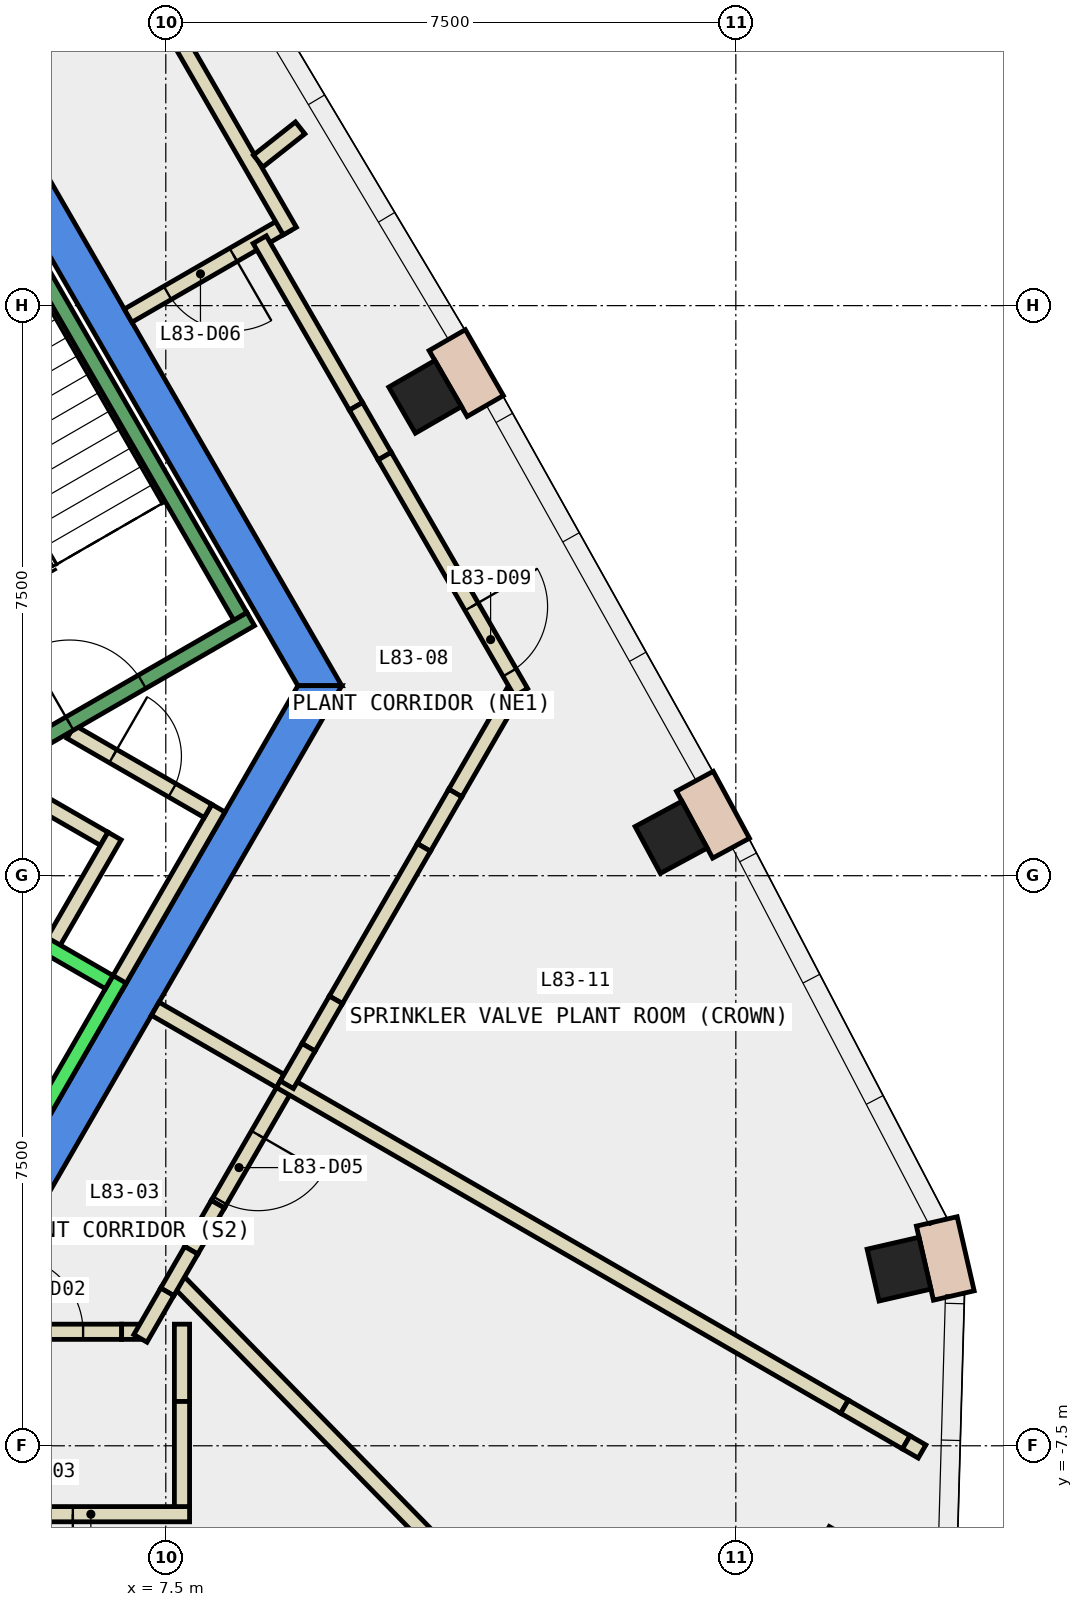
"""IFC4 building model, lengths in metres.
Left out: names, types, materials, properties, quantities, classifications, styles, units other than length and angle.
Written with IfcOpenShell. Run it as: python <this file> out.ifc"""

import sys

from ifc_helpers import new_model, si_unit, direction, frame, frame_2d, origin, origin_2d, place, context, subcontext, project, spatial, polyline, rectangle, outline, extrude, element, fill, save


model = new_model("IFC4")
c1 = context("Model", 3, precision=1e-05, world=origin(), true_north=direction((0.0, 1.0)))
c2 = subcontext(c1, "Body", "Model", "MODEL_VIEW")
j1 = project(units=[si_unit("LENGTHUNIT", "METRE"), si_unit("PLANEANGLEUNIT", "RADIAN")], contexts=[c1])
p1 = place(None, origin())
s1 = spatial("IfcSite", under=j1, at=p1, CompositionType="ELEMENT")
p2 = place(p1, origin())
s2 = spatial("IfcBuilding", under=s1, at=p2, CompositionType="ELEMENT")
p3 = place(p2, frame((0.0, 0.0, 353.9)))
s3 = spatial("IfcBuildingStorey", under=s2, at=p3, CompositionType="ELEMENT", Elevation=353.9)
p4 = place(p3, frame((16.486, -9.519, -0.35), z_axis=(0.0, 0.0, 1.0), x_axis=(-0.866025403784, 0.5, 0.0)))
e1 = element("IfcColumn", 1, at=p4, inside=s3, PredefinedType="COLUMN", context=c2, shape_type="SweptSolid", body=[
    extrude(rectangle(XDim=1.4, YDim=1.4, at=origin_2d()), origin(), (0.0, 0.0, 1.0), 4.4),
])
for number, where, z_axis, x_axis in (
    (2, (17.147, -5.176, -0.35), (0.0, 0.0, 1.0), (-0.224, 0.974, 0.0)),
    (3, (14.149, 0.505, -0.35), (0.0, 0.0, 1.0), (-0.475, 0.88, 0.0)),
    (4, (10.912, 6.3, -0.35), (0.0, 0.0, 1.0), (-0.5, 0.866, 0.0)),
):
    element("IfcColumn", number, at=place(p3, frame(where, z_axis=z_axis, x_axis=x_axis)), inside=s3, PredefinedType="COLUMN", context=c2, shape_type="SweptSolid", body=[
        extrude(rectangle(XDim=0.7, YDim=0.7, at=origin_2d()), origin(), (0.0, 0.0, 1.0), 4.4),
    ])
p5 = place(p3, frame((0.0, 0.0, -0.35)))
e5 = element("IfcWall", 5, at=p5, inside=s3, PredefinedType="SHEAR", context=c2, shape_type="SweptSolid", body=[
    extrude(outline(polyline([(5.486, 9.998), (5.053, 9.748), (9.238, 2.5), (9.815, 2.5), (5.486, 9.998)])), origin(), (0.0, 0.0, 1.0), 4.4),
])
p6 = place(p3, frame((0.0, 0.0, -0.35)))
e6 = element("IfcWall", 6, at=p6, inside=s3, PredefinedType="SHEAR", context=c2, shape_type="SweptSolid", body=[
    extrude(outline(polyline([(4.907, -6.0), (9.815, 2.5), (9.238, 2.5), (4.619, -5.5), (4.907, -6.0)])), origin(), (0.0, 0.0, 1.0), 4.4),
])
p7 = place(p3, frame((17.868, -5.523, 0.0), z_axis=(0.0, 0.0, 1.0), x_axis=(-0.223825449309, 0.974629246556, 0.0)))
e7 = element("IfcWall", 7, at=p7, inside=s3, PredefinedType="STANDARD", context=c2, shape_type="SweptSolid", body=[
    extrude(rectangle(XDim=1.0, YDim=0.55, at=frame_2d((0.5, 0.0))), origin(), (0.0, 0.0, 1.0), 4.05),
])
p8 = place(p3, frame((14.937, 0.362, 0.0), z_axis=(0.0, 0.0, 1.0), x_axis=(-0.475874292304, 0.879513307417, 0.0)))
e8 = element("IfcWall", 8, at=p8, inside=s3, PredefinedType="STANDARD", context=c2, shape_type="SweptSolid", body=[
    extrude(rectangle(XDim=1.0, YDim=0.55, at=frame_2d((0.5, 0.0))), origin(), (0.0, 0.0, 1.0), 4.05),
])
p9 = place(p3, frame((11.703, 6.179, 0.0), z_axis=(0.0, 0.0, 1.0), x_axis=(-0.49960277677, 0.866254619292, 0.0)))
e9 = element("IfcWall", 9, at=p9, inside=s3, PredefinedType="STANDARD", context=c2, shape_type="SweptSolid", body=[
    extrude(rectangle(XDim=1.001, YDim=0.55, at=frame_2d((0.5, 0.0))), origin(), (0.0, 0.0, 1.0), 4.05),
])
p10 = place(p3, frame((5.499, 1.172, 0.0), z_axis=(0.0, 0.0, 1.0), x_axis=(0.866333505267, -0.499465972466, 0.0)))
e10 = element("IfcWall", 10, at=p10, inside=s3, PredefinedType="PARTITIONING", context=c2, shape_type="SweptSolid", body=[
    extrude(rectangle(XDim=1.374, YDim=0.2, at=frame_2d((0.687, 0.0))), origin(), (0.0, 0.0, 1.0), 4.05),
])
p11 = place(p3, frame((6.826, 0.522, 0.0), z_axis=(0.0, 0.0, 1.0), x_axis=(-0.500016722714, -0.866015748706, 0.0)))
e11 = element("IfcWall", 11, at=p11, inside=s3, PredefinedType="PARTITIONING", context=c2, shape_type="SweptSolid", body=[
    extrude(rectangle(XDim=1.7, YDim=0.2, at=frame_2d((0.85, 0.0))), origin(), (0.0, 0.0, 1.0), 4.05),
])
p12 = place(p3, frame((8.192, 0.888, 0.0), z_axis=(0.0, 0.0, 1.0), x_axis=(-0.499940625693, -0.866059680843, 0.0)))
e12 = element("IfcWall", 12, at=p12, inside=s3, PredefinedType="PARTITIONING", context=c2, shape_type="SweptSolid", body=[
    extrude(rectangle(XDim=2.68, YDim=0.2, at=frame_2d((1.34, 0.0))), origin(), (0.0, 0.0, 1.0), 4.05),
])
p13 = place(p3, frame((6.25, 1.894, 0.0), z_axis=(0.0, 0.0, 1.0), x_axis=(0.866043184279, -0.499969202016, 0.0)))
e13 = element("IfcWall", 13, at=p13, inside=s3, PredefinedType="PARTITIONING", context=c2, shape_type="SweptSolid", body=[
    extrude(rectangle(XDim=2.084, YDim=0.2, at=frame_2d((1.042, 0.0))), origin(), (0.0, 0.0, 1.0), 4.05),
])
p14 = place(p13, frame((0.642, 0.0, 0.0)))
e14 = element("IfcOpeningElement", 14, at=p14, cuts=e13, PredefinedType="OPENING", context=c2, shape_type="SweptSolid", body=[
    extrude(rectangle(XDim=0.9, YDim=2.1, at=frame_2d((0.45, 1.05))), frame((0.0, 0.11, 0.0), z_axis=(0.0, -1.0, 0.0), x_axis=(1.0, 0.0, 0.0)), (0.0, 0.0, 1.0), 0.22),
])
p15 = place(p3, frame((7.813, -8.4, 0.0), z_axis=(0.0, 0.0, 1.0), x_axis=(-1.0, 0.0, 0.0)))
e15 = element("IfcWall", 15, at=p15, inside=s3, PredefinedType="PARTITIONING", context=c2, shape_type="SweptSolid", body=[
    extrude(rectangle(XDim=2.598, YDim=0.2, at=frame_2d((1.299, 0.0))), origin(), (0.0, 0.0, 1.0), 4.05),
])
p16 = place(p15, frame((1.536, 0.0, 0.0)))
e16 = element("IfcOpeningElement", 16, at=p16, cuts=e15, PredefinedType="OPENING", context=c2, shape_type="SweptSolid", body=[
    extrude(rectangle(XDim=1.0, YDim=2.1, at=frame_2d((0.5, 1.05))), frame((0.0, 0.11, 0.0), z_axis=(0.0, -1.0, 0.0), x_axis=(1.0, 0.0, 0.0)), (0.0, 0.0, 1.0), 0.22),
])
p17 = place(p3, frame((7.713, -5.9, 0.0), z_axis=(0.0, 0.0, 1.0), x_axis=(0.0, -1.0, 0.0)))
e17 = element("IfcWall", 17, at=p17, inside=s3, PredefinedType="PARTITIONING", context=c2, shape_type="SweptSolid", body=[
    extrude(rectangle(XDim=1.017, YDim=0.2, at=frame_2d((0.509, 0.0))), origin(), (0.0, 0.0, 1.0), 1.95),
])
p18 = place(p3, frame((9.093, -2.75, 0.0), z_axis=(0.0, 0.0, 1.0), x_axis=(-0.500145398563, -0.865941441609, 0.0)))
e18 = element("IfcWall", 18, at=p18, inside=s3, PredefinedType="PARTITIONING", context=c2, shape_type="SweptSolid", body=[
    extrude(rectangle(XDim=1.815, YDim=0.2, at=frame_2d((0.908, 0.0))), origin(), (0.0, 0.0, 1.0), 4.05),
])
p19 = place(p18, frame((0.759, 0.0, 0.0)))
e19 = element("IfcOpeningElement", 19, at=p19, cuts=e18, PredefinedType="OPENING", context=c2, shape_type="SweptSolid", body=[
    extrude(rectangle(XDim=1.0, YDim=2.1, at=frame_2d((0.5, 1.05))), frame((0.0, 0.11, 0.0), z_axis=(0.0, -1.0, 0.0), x_axis=(1.0, 0.0, 0.0)), (0.0, 0.0, 1.0), 0.22),
])
p20 = place(p3, frame((7.361, -1.75, 0.0), z_axis=(0.0, 0.0, 1.0), x_axis=(0.865980106173, -0.500078449558, 0.0)))
e20 = element("IfcWall", 20, at=p20, inside=s3, PredefinedType="PARTITIONING", context=c2, shape_type="SweptSolid", body=[
    extrude(rectangle(XDim=1.9, YDim=0.2, at=frame_2d((0.95, 0.0))), origin(), (0.0, 0.0, 1.0), 4.05),
])
p21 = place(p3, frame((7.624, -5.295, 0.0), z_axis=(0.0, 0.0, 1.0), x_axis=(0.699204125851, -0.714922086938, 0.0)))
e21 = element("IfcWall", 21, at=p21, inside=s3, PredefinedType="PARTITIONING", context=c2, shape_type="SweptSolid", body=[
    extrude(rectangle(XDim=8.465, YDim=0.2, at=frame_2d((4.233, 0.0))), origin(), (0.0, 0.0, 1.0), 4.05),
])
p22 = place(p3, frame((9.006, -2.7, 0.0), z_axis=(0.0, 0.0, 1.0), x_axis=(0.866026229868, -0.499998569178, 0.0)))
e22 = element("IfcWall", 22, at=p22, inside=s3, PredefinedType="PARTITIONING", context=c2, shape_type="SweptSolid", body=[
    extrude(rectangle(XDim=8.572, YDim=0.2, at=frame_2d((4.286, 0.0))), origin(), (0.0, 0.0, 1.0), 4.05),
])
p23 = place(p3, frame((9.082, 8.568, 0.0), z_axis=(0.0, 0.0, 1.0), x_axis=(-0.865955154139, -0.50012165622, 0.0)))
e23 = element("IfcWall", 23, at=p23, inside=s3, PredefinedType="PARTITIONING", context=c2, shape_type="SweptSolid", body=[
    extrude(rectangle(XDim=2.4, YDim=0.2, at=frame_2d((1.2, 0.0))), origin(), (0.0, 0.0, 1.0), 4.05),
])
p24 = place(p23, frame((0.8, 0.0, 0.0)))
e24 = element("IfcOpeningElement", 24, at=p24, cuts=e23, PredefinedType="OPENING", context=c2, shape_type="SweptSolid", body=[
    extrude(rectangle(XDim=1.0, YDim=2.1, at=frame_2d((0.5, 1.05))), frame((0.0, 0.11, 0.0), z_axis=(0.0, -1.0, 0.0), x_axis=(1.0, 0.0, 0.0)), (0.0, 0.0, 1.0), 0.22),
])
p25 = place(p3, frame((7.388, 11.502, 0.0), z_axis=(0.0, 0.0, 1.0), x_axis=(0.499993059066, -0.866029411098, 0.0)))
e25 = element("IfcWall", 25, at=p25, inside=s3, PredefinedType="PARTITIONING", context=c2, shape_type="SweptSolid", body=[
    extrude(rectangle(XDim=3.488, YDim=0.2, at=frame_2d((1.744, 0.0))), origin(), (0.0, 0.0, 1.0), 1.95),
])
p26 = place(p3, frame((8.736, 8.368, 0.0), z_axis=(0.0, 0.0, 1.0), x_axis=(0.499945030264, -0.86605713825, 0.0)))
e26 = element("IfcWall", 26, at=p26, inside=s3, PredefinedType="PARTITIONING", context=c2, shape_type="SweptSolid", body=[
    extrude(rectangle(XDim=2.532, YDim=0.2, at=frame_2d((1.266, 0.0))), origin(), (0.0, 0.0, 1.0), 4.05),
])
p27 = place(p3, frame((12.074, 2.413, 0.0), z_axis=(0.0, 0.0, 1.0), x_axis=(-0.499897408884, -0.866084626691, 0.0)))
e27 = element("IfcWall", 27, at=p27, inside=s3, PredefinedType="PARTITIONING", context=c2, shape_type="SweptSolid", body=[
    extrude(rectangle(XDim=1.53, YDim=0.2, at=frame_2d((0.765, 0.0))), origin(), (0.0, 0.0, 1.0), 4.05),
])
p28 = place(p3, frame((9.268, 9.838, 0.0), z_axis=(0.0, 0.0, 1.0), x_axis=(-0.784572335163, -0.620037297988, 0.0)))
e28 = element("IfcWall", 28, at=p28, inside=s3, PredefinedType="PARTITIONING", context=c2, shape_type="SweptSolid", body=[
    extrude(rectangle(XDim=0.705, YDim=0.2, at=frame_2d((0.353, 0.0))), origin(), (0.0, 0.0, 1.0), 1.95),
])
p29 = place(p3, frame((5.076, -6.0, 0.0), z_axis=(0.0, 0.0, 1.0), x_axis=(1.0, 0.0, 0.0)))
e29 = element("IfcWall", 29, at=p29, inside=s3, PredefinedType="PARTITIONING", context=c2, shape_type="SweptSolid", body=[
    extrude(rectangle(XDim=1.843, YDim=0.2, at=frame_2d((0.921, 0.0))), origin(), (0.0, 0.0, 1.0), 4.05),
])
p30 = place(p29, frame((0.336, 0.0, 0.0)))
e30 = element("IfcOpeningElement", 30, at=p30, cuts=e29, PredefinedType="OPENING", context=c2, shape_type="SweptSolid", body=[
    extrude(rectangle(XDim=1.0, YDim=2.1, at=frame_2d((0.5, 1.05))), frame((0.0, 0.11, 0.0), z_axis=(0.0, -1.0, 0.0), x_axis=(1.0, 0.0, 0.0)), (0.0, 0.0, 1.0), 0.22),
])
p31 = place(p3, frame((6.919, -6.0, 0.0), z_axis=(0.0, 0.0, 1.0), x_axis=(1.0, 0.0, 0.0)))
e31 = element("IfcWall", 31, at=p31, inside=s3, PredefinedType="PARTITIONING", context=c2, shape_type="SweptSolid", body=[
    extrude(rectangle(XDim=0.242, YDim=0.2, at=frame_2d((0.121, 0.0))), origin(), (0.0, 0.0, 1.0), 1.95),
])
p32 = place(p3, frame((7.713, -6.917, 0.0), z_axis=(0.0, 0.0, 1.0), x_axis=(0.0, -1.0, 0.0)))
e32 = element("IfcWall", 32, at=p32, inside=s3, PredefinedType="PARTITIONING", context=c2, shape_type="SweptSolid", body=[
    extrude(rectangle(XDim=1.383, YDim=0.2, at=frame_2d((0.691, 0.0))), origin(), (0.0, 0.0, 1.0), 4.05),
])
p33 = place(p3, frame((8.185, -4.322, 0.0), z_axis=(0.0, 0.0, 1.0), x_axis=(-0.500265973451, -0.865871789474, 0.0)))
e33 = element("IfcWall", 33, at=p33, inside=s3, PredefinedType="PARTITIONING", context=c2, shape_type="SweptSolid", body=[
    extrude(rectangle(XDim=0.7, YDim=0.2, at=frame_2d((0.35, 0.0))), origin(), (0.0, 0.0, 1.0), 1.95),
])
p34 = place(p3, frame((7.835, -4.928, 0.0), z_axis=(0.0, 0.0, 1.0), x_axis=(-0.500045805297, -0.865998956469, 0.0)))
e34 = element("IfcWall", 34, at=p34, inside=s3, PredefinedType="PARTITIONING", context=c2, shape_type="SweptSolid", body=[
    extrude(rectangle(XDim=0.632, YDim=0.2, at=frame_2d((0.316, 0.0))), origin(), (0.0, 0.0, 1.0), 4.05),
])
p35 = place(p3, frame((7.519, -5.475, 0.0), z_axis=(0.0, 0.0, 1.0), x_axis=(-0.499782295163, -0.866151059251, 0.0)))
e35 = element("IfcWall", 35, at=p35, inside=s3, PredefinedType="PARTITIONING", context=c2, shape_type="SweptSolid", body=[
    extrude(rectangle(XDim=0.706, YDim=0.2, at=frame_2d((0.353, 0.0))), origin(), (0.0, 0.0, 1.0), 1.95),
])
p36 = place(p3, frame((16.43, -6.986, 0.0), z_axis=(0.0, 0.0, 1.0), x_axis=(0.865942754999, -0.50014312458, 0.0)))
e36 = element("IfcWall", 36, at=p36, inside=s3, PredefinedType="PARTITIONING", context=c2, shape_type="SweptSolid", body=[
    extrude(rectangle(XDim=0.938, YDim=0.2, at=frame_2d((0.469, 0.0))), origin(), (0.0, 0.0, 1.0), 1.95),
])
p37 = place(p3, frame((17.242, -7.455, 0.0), z_axis=(0.0, 0.0, 1.0), x_axis=(0.866422508423, -0.499311562953, 0.0)))
e37 = element("IfcWall", 37, at=p37, inside=s3, PredefinedType="PARTITIONING", context=c2, shape_type="SweptSolid", body=[
    extrude(rectangle(XDim=0.24, YDim=0.2, at=frame_2d((0.12, 0.0))), origin(), (0.0, 0.0, 1.0), 4.05),
])
p38 = place(p3, frame((10.002, 6.175, 0.0), z_axis=(0.0, 0.0, 1.0), x_axis=(0.499750401311, -0.866169461704, 0.0)))
e38 = element("IfcWall", 38, at=p38, inside=s3, PredefinedType="PARTITIONING", context=c2, shape_type="SweptSolid", body=[
    extrude(rectangle(XDim=0.756, YDim=0.2, at=frame_2d((0.378, 0.0))), origin(), (0.0, 0.0, 1.0), 1.95),
])
p39 = place(p3, frame((10.38, 5.52, 0.0), z_axis=(0.0, 0.0, 1.0), x_axis=(0.500083720737, -0.865977062199, 0.0)))
e39 = element("IfcWall", 39, at=p39, inside=s3, PredefinedType="PARTITIONING", context=c2, shape_type="SweptSolid", body=[
    extrude(rectangle(XDim=3.588, YDim=0.2, at=frame_2d((1.794, 0.0))), origin(), (0.0, 0.0, 1.0), 4.05),
])
p40 = place(p39, frame((2.287, 0.0, 0.0)))
e40 = element("IfcOpeningElement", 40, at=p40, cuts=e39, PredefinedType="OPENING", context=c2, shape_type="SweptSolid", body=[
    extrude(rectangle(XDim=1.0, YDim=2.1, at=frame_2d((0.5, 1.05))), frame((0.0, 0.11, 0.0), z_axis=(0.0, -1.0, 0.0), x_axis=(1.0, 0.0, 0.0)), (0.0, 0.0, 1.0), 0.22),
])
p41 = place(p3, frame((11.309, 1.088, 0.0), z_axis=(0.0, 0.0, 1.0), x_axis=(-0.499824743306, -0.866126564642, 0.0)))
e41 = element("IfcWall", 41, at=p41, inside=s3, PredefinedType="PARTITIONING", context=c2, shape_type="SweptSolid", body=[
    extrude(rectangle(XDim=0.826, YDim=0.2, at=frame_2d((0.413, 0.0))), origin(), (0.0, 0.0, 1.0), 1.95),
])
p42 = place(p3, frame((10.896, 0.372, 0.0), z_axis=(0.0, 0.0, 1.0), x_axis=(-0.500096650539, -0.865969595378, 0.0)))
e42 = element("IfcWall", 42, at=p42, inside=s3, PredefinedType="PARTITIONING", context=c2, shape_type="SweptSolid", body=[
    extrude(rectangle(XDim=2.315, YDim=0.2, at=frame_2d((1.158, 0.0))), origin(), (0.0, 0.0, 1.0), 4.05),
])
p43 = place(p3, frame((9.738, -1.633, 0.0), z_axis=(0.0, 0.0, 1.0), x_axis=(-0.499820234884, -0.866129166349, 0.0)))
e43 = element("IfcWall", 43, at=p43, inside=s3, PredefinedType="PARTITIONING", context=c2, shape_type="SweptSolid", body=[
    extrude(rectangle(XDim=0.72, YDim=0.2, at=frame_2d((0.36, 0.0))), origin(), (0.0, 0.0, 1.0), 1.95),
])
p44 = place(p3, frame((9.378, -2.257, 0.0), z_axis=(0.0, 0.0, 1.0), x_axis=(-0.500427620203, -0.86577837634, 0.0)))
e44 = element("IfcWall", 44, at=p44, inside=s3, PredefinedType="PARTITIONING", context=c2, shape_type="SweptSolid", body=[
    extrude(rectangle(XDim=0.569, YDim=0.2, at=frame_2d((0.285, 0.0))), origin(), (0.0, 0.0, 1.0), 4.05),
])
p45 = place(p3, frame((5.492, -3.788, 0.0), z_axis=(0.0, 0.0, 1.0), x_axis=(0.500011755427, 0.866018616679, 0.0)))
e45 = element("IfcWall", 45, at=p45, inside=s3, PredefinedType="STANDARD", context=c2, shape_type="SweptSolid", body=[
    extrude(rectangle(XDim=2.8, YDim=0.2, at=frame_2d((1.4, 0.0))), origin(), (0.0, 0.0, 1.0), 4.05),
])
p46 = place(p3, frame((4.677, -0.2, 0.0), z_axis=(0.0, 0.0, 1.0), x_axis=(0.865973769406, -0.500089422704, 0.0)))
e46 = element("IfcWall", 46, at=p46, inside=s3, PredefinedType="STANDARD", context=c2, shape_type="SweptSolid", body=[
    extrude(rectangle(XDim=2.399, YDim=0.2, at=frame_2d((1.2, 0.0))), origin(), (0.0, 0.0, 1.0), 4.05),
])
p47 = place(p3, frame((4.806, 1.176, 0.0), z_axis=(0.0, 0.0, 1.0), x_axis=(0.866059941101, 0.499940174841, 0.0)))
e47 = element("IfcWall", 47, at=p47, inside=s3, PredefinedType="STANDARD", context=c2, shape_type="SweptSolid", body=[
    extrude(rectangle(XDim=4.4, YDim=0.2, at=frame_2d((2.2, 0.0))), origin(), (0.0, 0.0, 1.0), 4.05),
])
p48 = place(p47, frame((1.65, 0.0, 0.0)))
e48 = element("IfcOpeningElement", 48, at=p48, cuts=e47, PredefinedType="OPENING", context=c2, shape_type="SweptSolid", body=[
    extrude(rectangle(XDim=1.1, YDim=2.2, at=frame_2d((0.55, 1.1))), frame((0.0, 0.11, 0.0), z_axis=(0.0, -1.0, 0.0), x_axis=(1.0, 0.0, 0.0)), (0.0, 0.0, 1.0), 0.22),
])
p49 = place(p3, frame((8.48, 3.412, 0.0), z_axis=(0.0, 0.0, 1.0), x_axis=(-0.499978703459, 0.866037698999, 0.0)))
e49 = element("IfcWall", 49, at=p49, inside=s3, PredefinedType="STANDARD", context=c2, shape_type="SweptSolid", body=[
    extrude(rectangle(XDim=6.9, YDim=0.2, at=frame_2d((3.45, 0.0))), origin(), (0.0, 0.0, 1.0), 4.05),
])
p50 = place(p30, origin())
e50 = element("IfcDoor", 50, at=p50, inside=s3, OperationType="SINGLE_SWING_RIGHT", PredefinedType="DOOR", context=c2, shape_type="SweptSolid", body=[
    extrude(rectangle(XDim=1.0, YDim=2.1, at=frame_2d((0.5, 1.05))), frame((0.0, 0.025, 0.0), z_axis=(0.0, -1.0, 0.0), x_axis=(1.0, 0.0, 0.0)), (0.0, 0.0, 1.0), 0.05),
])
fill(e30, e50)
p51 = place(p16, origin())
e51 = element("IfcDoor", 51, at=p51, inside=s3, OperationType="SINGLE_SWING_LEFT", PredefinedType="DOOR", context=c2, shape_type="SweptSolid", body=[
    extrude(rectangle(XDim=1.0, YDim=2.1, at=frame_2d((0.5, 1.05))), frame((0.0, 0.025, 0.0), z_axis=(0.0, -1.0, 0.0), x_axis=(1.0, 0.0, 0.0)), (0.0, 0.0, 1.0), 0.05),
])
fill(e16, e51)
p52 = place(p19, origin())
e52 = element("IfcDoor", 52, at=p52, inside=s3, OperationType="SINGLE_SWING_LEFT", PredefinedType="DOOR", context=c2, shape_type="SweptSolid", body=[
    extrude(rectangle(XDim=1.0, YDim=2.1, at=frame_2d((0.5, 1.05))), frame((0.0, 0.025, 0.0), z_axis=(0.0, -1.0, 0.0), x_axis=(1.0, 0.0, 0.0)), (0.0, 0.0, 1.0), 0.05),
])
fill(e19, e52)
p53 = place(p24, origin())
e53 = element("IfcDoor", 53, at=p53, inside=s3, OperationType="SINGLE_SWING_LEFT", PredefinedType="DOOR", context=c2, shape_type="SweptSolid", body=[
    extrude(rectangle(XDim=1.0, YDim=2.1, at=frame_2d((0.5, 1.05))), frame((0.0, 0.025, 0.0), z_axis=(0.0, -1.0, 0.0), x_axis=(1.0, 0.0, 0.0)), (0.0, 0.0, 1.0), 0.05),
])
fill(e24, e53)
p54 = place(p40, origin())
e54 = element("IfcDoor", 54, at=p54, inside=s3, OperationType="SINGLE_SWING_RIGHT", PredefinedType="DOOR", context=c2, shape_type="SweptSolid", body=[
    extrude(rectangle(XDim=1.0, YDim=2.1, at=frame_2d((0.5, 1.05))), frame((0.0, 0.025, 0.0), z_axis=(0.0, -1.0, 0.0), x_axis=(1.0, 0.0, 0.0)), (0.0, 0.0, 1.0), 0.05),
])
fill(e40, e54)
p55 = place(p14, origin())
e55 = element("IfcDoor", 55, at=p55, inside=s3, OperationType="SINGLE_SWING_LEFT", PredefinedType="DOOR", context=c2, shape_type="SweptSolid", body=[
    extrude(rectangle(XDim=0.9, YDim=2.1, at=frame_2d((0.45, 1.05))), frame((0.0, 0.025, 0.0), z_axis=(0.0, -1.0, 0.0), x_axis=(1.0, 0.0, 0.0)), (0.0, 0.0, 1.0), 0.05),
])
fill(e14, e55)
p56 = place(p48, origin())
e56 = element("IfcDoor", 56, at=p56, inside=s3, OperationType="SINGLE_SWING_LEFT", PredefinedType="DOOR", context=c2, shape_type="SweptSolid", body=[
    extrude(rectangle(XDim=1.1, YDim=2.2, at=frame_2d((0.55, 1.1))), frame((0.0, 0.025, 0.0), z_axis=(0.0, -1.0, 0.0), x_axis=(1.0, 0.0, 0.0)), (0.0, 0.0, 1.0), 0.05),
])
fill(e48, e56)
save(model, sys.argv[1])
